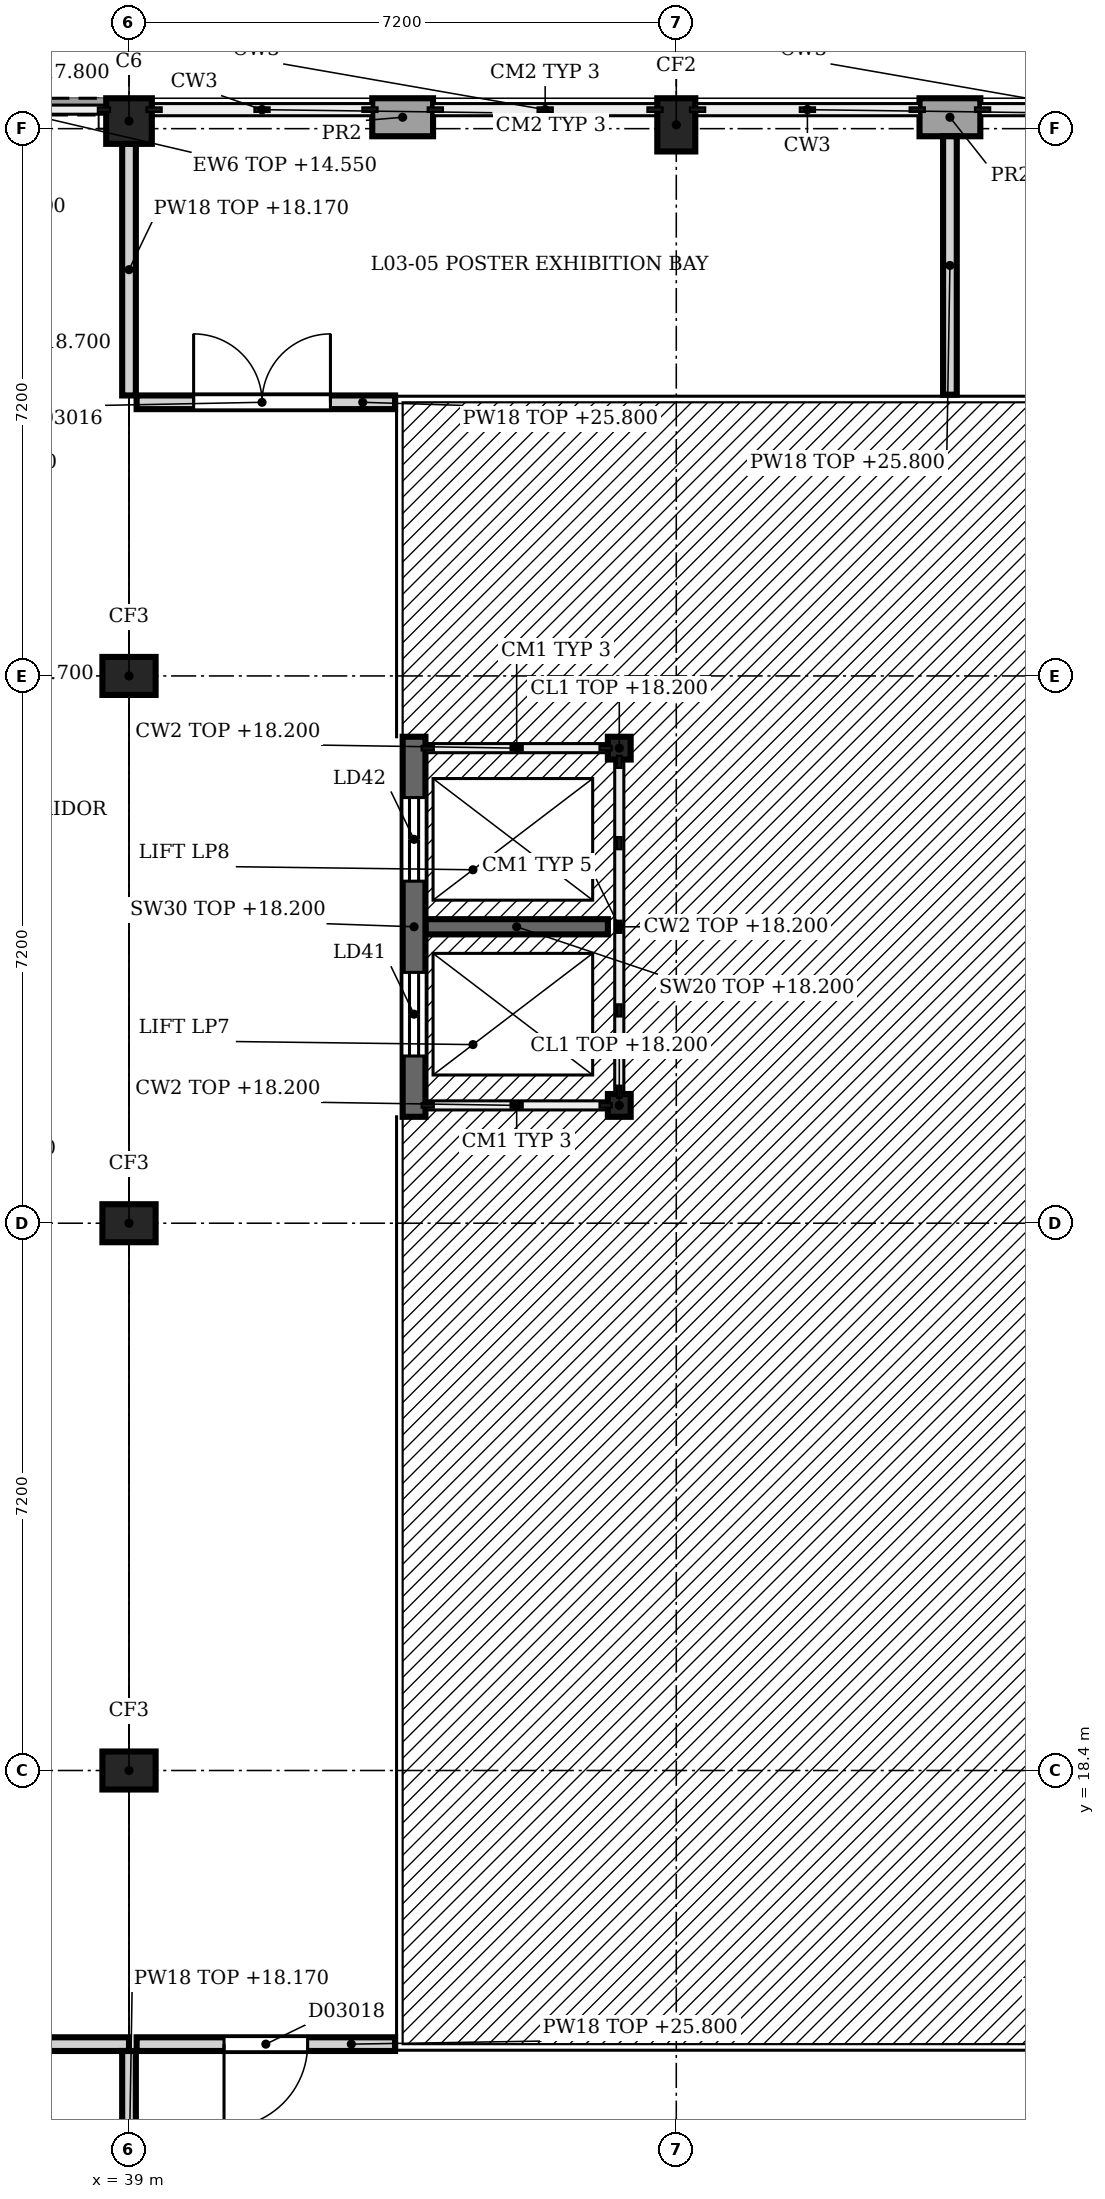
"""IFC4 building model, lengths in metres.
Left out: names, types, materials, properties, quantities, classifications, styles, units other than length and angle.
Written with IfcOpenShell. Run it as: python <this file> out.ifc"""

import sys

from ifc_helpers import new_model, si_unit, direction, frame, frame_2d, origin, origin_2d, place, context, subcontext, project, spatial, rectangle, extrude, element, fill, save


model = new_model("IFC4")
c1 = context("Model", 3, precision=1e-05, world=origin(), true_north=direction((0.0, 1.0)))
c2 = subcontext(c1, "Body", "Model", "MODEL_VIEW")
j1 = project(units=[si_unit("LENGTHUNIT", "METRE"), si_unit("PLANEANGLEUNIT", "RADIAN")], contexts=[c1])
p1 = place(None, origin())
s1 = spatial("IfcSite", under=j1, at=p1, CompositionType="ELEMENT")
p2 = place(p1, origin())
s2 = spatial("IfcBuilding", under=s1, at=p2, CompositionType="ELEMENT")
p3 = place(p2, frame((0.0, 0.0, 14.4)))
s3 = spatial("IfcBuildingStorey", under=s2, at=p3, CompositionType="ELEMENT", Elevation=14.4)
for number, where, z_axis, x_axis in (
    (1, (39.0, 18.4, 0.0), (0.0, 0.0, 1.0), (1.0, 0.0, 0.0)),
    (2, (39.0, 25.6, 0.0), (0.0, 0.0, 1.0), (1.0, 0.0, 0.0)),
    (3, (39.0, 32.8, 0.0), (0.0, 0.0, 1.0), (1.0, 0.0, 0.0)),
):
    element("IfcColumn", number, at=place(p3, frame(where, z_axis=z_axis, x_axis=x_axis)), inside=s3, PredefinedType="COLUMN", context=c2, shape_type="SweptSolid", body=[
        extrude(rectangle(XDim=0.7, YDim=0.5, at=origin_2d()), origin(), (0.0, 0.0, 1.0), 4.5),
    ])
p4 = place(p3, frame((39.0, 40.1, 0.0), z_axis=(0.0, 0.0, 1.0), x_axis=(1.0, 0.0, 0.0)))
e4 = element("IfcColumn", 4, at=p4, inside=s3, PredefinedType="COLUMN", context=c2, shape_type="SweptSolid", body=[
    extrude(rectangle(XDim=0.6, YDim=0.6, at=origin_2d()), origin(), (0.0, 0.0, 1.0), 4.5),
])
p5 = place(p3, frame((46.2, 40.05, 0.0), z_axis=(0.0, 0.0, 1.0), x_axis=(1.0, 0.0, 0.0)))
e5 = element("IfcColumn", 5, at=p5, inside=s3, PredefinedType="COLUMN", context=c2, shape_type="SweptSolid", body=[
    extrude(rectangle(XDim=0.5, YDim=0.7, at=origin_2d()), origin(), (0.0, 0.0, 1.0), 4.5),
])
p6 = place(p3, frame((35.8, 40.29, 0.0), z_axis=(0.0, 0.0, 1.0), x_axis=(1.0, 0.0, 0.0)))
e6 = element("IfcWall", 6, at=p6, inside=s3, PredefinedType="SOLIDWALL", context=c2, shape_type="SweptSolid", body=[
    extrude(rectangle(XDim=2.9, YDim=0.22, at=frame_2d((1.45, 0.0))), origin(), (0.0, 0.0, 1.0), 0.15),
])
for number, where, z_axis, x_axis in (
    (7, (42.2, 40.15, 0.0), (0.0, 0.0, 1.0), (1.0, 0.0, 0.0)),
    (8, (49.4, 40.15, 0.0), (0.0, 0.0, 1.0), (1.0, 0.0, 0.0)),
):
    element("IfcWall", number, at=place(p3, frame(where, z_axis=z_axis, x_axis=x_axis)), inside=s3, PredefinedType="SOLIDWALL", context=c2, shape_type="SweptSolid", body=[
        extrude(rectangle(XDim=0.8, YDim=0.5, at=frame_2d((0.4, 0.0))), origin(), (0.0, 0.0, 1.0), 4.5),
    ])
p7 = place(p3, frame((39.0, 14.8, 0.0), z_axis=(0.0, 0.0, 1.0), x_axis=(-1.0, 0.0, 0.0)))
e9 = element("IfcWall", 9, at=p7, inside=s3, PredefinedType="PARTITIONING", context=c2, shape_type="SweptSolid", body=[
    extrude(rectangle(XDim=3.6, YDim=0.18, at=frame_2d((1.8, 0.0))), origin(), (0.0, 0.0, 1.0), 4.3),
])
p8 = place(p7, frame((1.25, 0.0, 0.0)))
e10 = element("IfcOpeningElement", 10, at=p8, cuts=e9, PredefinedType="OPENING", context=c2, shape_type="SweptSolid", body=[
    extrude(rectangle(XDim=1.1, YDim=2.3, at=frame_2d((0.55, 1.15))), frame((0.0, 0.1, 0.0), z_axis=(0.0, -1.0, 0.0), x_axis=(1.0, 0.0, 0.0)), (0.0, 0.0, 1.0), 0.2),
])
p9 = place(p3, frame((42.5, 14.8, 0.0), z_axis=(0.0, 0.0, 1.0), x_axis=(-1.0, 0.0, 0.0)))
e11 = element("IfcWall", 11, at=p9, inside=s3, PredefinedType="PARTITIONING", context=c2, shape_type="SweptSolid", body=[
    extrude(rectangle(XDim=3.4, YDim=0.18, at=frame_2d((1.7, 0.0))), origin(), (0.0, 0.0, 1.0), 11.4),
])
p10 = place(p9, frame((1.15, 0.0, 0.0)))
e12 = element("IfcOpeningElement", 12, at=p10, cuts=e11, PredefinedType="OPENING", context=c2, shape_type="SweptSolid", body=[
    extrude(rectangle(XDim=1.1, YDim=2.3, at=frame_2d((0.55, 1.15))), frame((0.0, 0.1, 0.0), z_axis=(0.0, -1.0, 0.0), x_axis=(1.0, 0.0, 0.0)), (0.0, 0.0, 1.0), 0.2),
])
p11 = place(p3, frame((42.5, 36.4, 0.0), z_axis=(0.0, 0.0, 1.0), x_axis=(-1.0, 0.0, 0.0)))
e13 = element("IfcWall", 13, at=p11, inside=s3, PredefinedType="PARTITIONING", context=c2, shape_type="SweptSolid", body=[
    extrude(rectangle(XDim=3.4, YDim=0.18, at=frame_2d((1.7, 0.0))), origin(), (0.0, 0.0, 1.0), 11.4),
])
p12 = place(p11, frame((0.85, 0.0, 0.0)))
e14 = element("IfcOpeningElement", 14, at=p12, cuts=e13, PredefinedType="OPENING", context=c2, shape_type="SweptSolid", body=[
    extrude(rectangle(XDim=1.8, YDim=2.3, at=frame_2d((0.9, 1.15))), frame((0.0, 0.1, 0.0), z_axis=(0.0, -1.0, 0.0), x_axis=(1.0, 0.0, 0.0)), (0.0, 0.0, 1.0), 0.2),
])
for number, where, z_axis, x_axis in (
    (15, (39.0, 11.4, 0.0), (0.0, 0.0, 1.0), (0.0, 1.0, 0.0)),
    (16, (39.0, 36.49, 0.0), (0.0, 0.0, 1.0), (0.0, 1.0, 0.0)),
):
    element("IfcWall", number, at=place(p3, frame(where, z_axis=z_axis, x_axis=x_axis)), inside=s3, PredefinedType="PARTITIONING", context=c2, shape_type="SweptSolid", body=[
        extrude(rectangle(XDim=3.31, YDim=0.18, at=frame_2d((1.655, 0.0))), origin(), (0.0, 0.0, 1.0), 3.77),
    ])
p13 = place(p3, frame((49.8, 36.5, 0.0), z_axis=(0.0, 0.0, 1.0), x_axis=(0.0, 1.0, 0.0)))
e17 = element("IfcWall", 17, at=p13, inside=s3, PredefinedType="PARTITIONING", context=c2, shape_type="SweptSolid", body=[
    extrude(rectangle(XDim=3.4, YDim=0.18, at=frame_2d((1.7, 0.0))), origin(), (0.0, 0.0, 1.0), 11.4),
])
p14 = place(p3, frame((42.75, 27.0, 0.0), z_axis=(0.0, 0.0, 1.0), x_axis=(0.0, 1.0, 0.0)))
e18 = element("IfcWall", 18, at=p14, inside=s3, PredefinedType="SHEAR", context=c2, shape_type="SweptSolid", body=[
    extrude(rectangle(XDim=5.0, YDim=0.3, at=frame_2d((2.5, 0.0))), origin(), (0.0, 0.0, 1.0), 3.8),
])
p15 = place(p14, frame((0.8, 0.0, 0.0)))
e19 = element("IfcOpeningElement", 19, at=p15, cuts=e18, PredefinedType="OPENING", context=c2, shape_type="SweptSolid", body=[
    extrude(rectangle(XDim=1.1, YDim=2.1, at=frame_2d((0.55, 1.05))), frame((0.0, 0.16, 0.0), z_axis=(0.0, -1.0, 0.0), x_axis=(1.0, 0.0, 0.0)), (0.0, 0.0, 1.0), 0.32),
])
p16 = place(p14, frame((3.1, 0.0, 0.0)))
e20 = element("IfcOpeningElement", 20, at=p16, cuts=e18, PredefinedType="OPENING", context=c2, shape_type="SweptSolid", body=[
    extrude(rectangle(XDim=1.1, YDim=2.1, at=frame_2d((0.55, 1.05))), frame((0.0, 0.16, 0.0), z_axis=(0.0, -1.0, 0.0), x_axis=(1.0, 0.0, 0.0)), (0.0, 0.0, 1.0), 0.32),
])
p17 = place(p3, frame((42.9, 29.5, 0.0), z_axis=(0.0, 0.0, 1.0), x_axis=(1.0, 0.0, 0.0)))
e21 = element("IfcWall", 21, at=p17, inside=s3, PredefinedType="SHEAR", context=c2, shape_type="SweptSolid", body=[
    extrude(rectangle(XDim=2.4, YDim=0.2, at=frame_2d((1.2, 0.0))), origin(), (0.0, 0.0, 1.0), 3.8),
])
for number, where, z_axis, x_axis in (
    (22, (45.45, 27.15, 0.0), (0.0, 0.0, 1.0), (1.0, 0.0, 0.0)),
    (23, (45.45, 31.85, 0.0), (0.0, 0.0, 1.0), (1.0, 0.0, 0.0)),
):
    element("IfcColumn", number, at=place(p3, frame(where, z_axis=z_axis, x_axis=x_axis)), inside=s3, PredefinedType="COLUMN", context=c2, shape_type="SweptSolid", body=[
        extrude(rectangle(XDim=0.3, YDim=0.3, at=origin_2d()), origin(), (0.0, 0.0, 1.0), 3.8),
    ])
p18 = place(p10, origin())
e24 = element("IfcDoor", 24, at=p18, inside=s3, OperationType="SINGLE_SWING_RIGHT", PredefinedType="DOOR", context=c2, shape_type="SweptSolid", body=[
    extrude(rectangle(XDim=1.1, YDim=2.3, at=frame_2d((0.55, 1.15))), frame((0.0, 0.025, 0.0), z_axis=(0.0, -1.0, 0.0), x_axis=(1.0, 0.0, 0.0)), (0.0, 0.0, 1.0), 0.05),
])
fill(e12, e24)
p19 = place(p12, origin())
e25 = element("IfcDoor", 25, at=p19, inside=s3, OperationType="SINGLE_SWING_LEFT", PredefinedType="DOOR", context=c2, shape_type="SweptSolid", body=[
    extrude(rectangle(XDim=1.8, YDim=2.3, at=frame_2d((0.9, 1.15))), frame((0.0, 0.025, 0.0), z_axis=(0.0, -1.0, 0.0), x_axis=(1.0, 0.0, 0.0)), (0.0, 0.0, 1.0), 0.05),
])
fill(e14, e25)
p20 = place(p15, origin())
e26 = element("IfcDoor", 26, at=p20, inside=s3, OperationType="DOUBLE_DOOR_SLIDING", PredefinedType="DOOR", context=c2, shape_type="SweptSolid", body=[
    extrude(rectangle(XDim=1.1, YDim=2.1, at=frame_2d((0.55, 1.05))), frame((0.0, 0.025, 0.0), z_axis=(0.0, -1.0, 0.0), x_axis=(1.0, 0.0, 0.0)), (0.0, 0.0, 1.0), 0.05),
])
fill(e19, e26)
p21 = place(p16, origin())
e27 = element("IfcDoor", 27, at=p21, inside=s3, OperationType="DOUBLE_DOOR_SLIDING", PredefinedType="DOOR", context=c2, shape_type="SweptSolid", body=[
    extrude(rectangle(XDim=1.1, YDim=2.1, at=frame_2d((0.55, 1.05))), frame((0.0, 0.025, 0.0), z_axis=(0.0, -1.0, 0.0), x_axis=(1.0, 0.0, 0.0)), (0.0, 0.0, 1.0), 0.05),
])
fill(e20, e27)
save(model, sys.argv[1])
